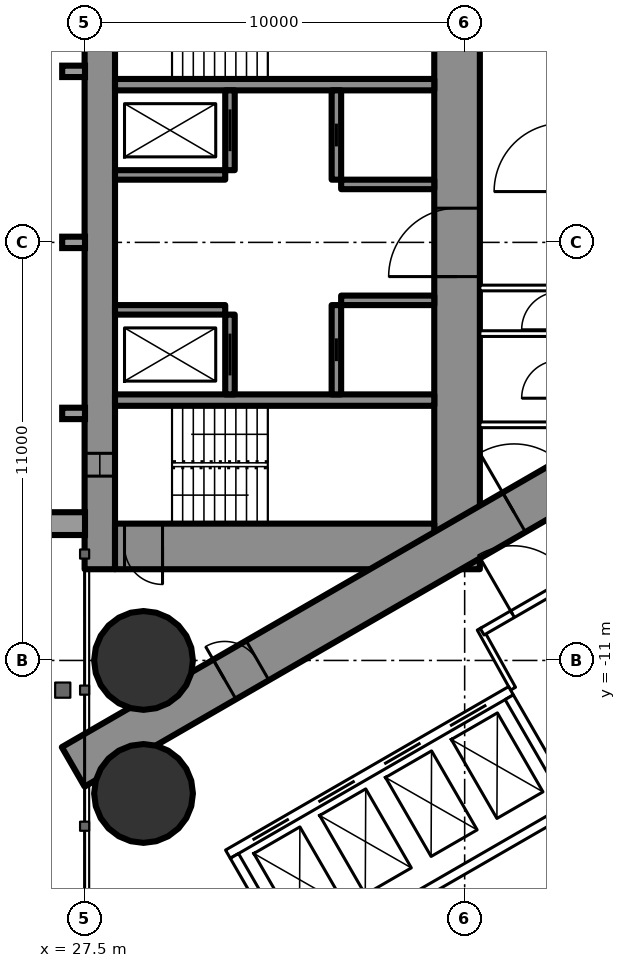
"""IFC4 building model, lengths in metres.
Left out: names, types, materials, properties, quantities, classifications, styles, units other than length and angle.
Written with IfcOpenShell. Run it as: python <this file> out.ifc"""

import sys

from ifc_helpers import new_model, si_unit, direction, frame, frame_2d, origin, origin_2d, place, context, subcontext, project, spatial, rectangle, hollow_circle, extrude, element, fill, save


model = new_model("IFC4")
c1 = context("Model", 3, precision=1e-05, world=origin(), true_north=direction((0.0, 1.0)))
c2 = subcontext(c1, "Body", "Model", "MODEL_VIEW")
j1 = project(units=[si_unit("LENGTHUNIT", "METRE"), si_unit("PLANEANGLEUNIT", "RADIAN")], contexts=[c1])
p1 = place(None, origin())
s1 = spatial("IfcSite", under=j1, at=p1, CompositionType="ELEMENT")
p2 = place(p1, origin())
s2 = spatial("IfcBuilding", under=s1, at=p2, CompositionType="ELEMENT")
p3 = place(p2, frame((0.0, 0.0, 122.1)))
s3 = spatial("IfcBuildingStorey", under=s2, at=p3, CompositionType="ELEMENT", Elevation=122.1)
for number, where, z_axis, x_axis in (
    (1, (29.05, -11.0, 0.0), (0.0, 0.0, 1.0), (1.0, 0.0, 0.0)),
    (2, (29.05, -14.5, 0.0), (0.0, 0.0, 1.0), (1.0, 0.0, 0.0)),
):
    element("IfcColumn", number, at=place(p3, frame(where, z_axis=z_axis, x_axis=x_axis)), inside=s3, PredefinedType="COLUMN", context=c2, shape_type="SweptSolid", body=[
        extrude(hollow_circle(Radius=1.3, WallThickness=0.1, at=origin_2d()), origin(), (0.0, 0.0, 1.0), 3.5),
    ])
p4 = place(p3, frame((27.9, -8.6, 0.0), z_axis=(0.0, 0.0, 1.0), x_axis=(0.0, 1.0, 0.0)))
e3 = element("IfcWall", 3, at=p4, inside=s3, PredefinedType="SHEAR", context=c2, shape_type="SweptSolid", body=[
    extrude(rectangle(XDim=17.2, YDim=0.8, at=frame_2d((8.6, 0.0))), origin(), (0.0, 0.0, 1.0), 3.5),
])
p5 = place(p4, frame((2.45, 0.0, 0.6)))
e4 = element("IfcOpeningElement", 4, at=p5, cuts=e3, PredefinedType="OPENING", context=c2, shape_type="SweptSolid", body=[
    extrude(rectangle(XDim=0.6, YDim=2.1, at=frame_2d((0.3, 1.05))), frame((0.0, 0.41, 0.0), z_axis=(0.0, -1.0, 0.0), x_axis=(1.0, 0.0, 0.0)), (0.0, 0.0, 1.0), 0.82),
])
p6 = place(p4, frame((14.15, 0.0, 0.6)))
e5 = element("IfcOpeningElement", 5, at=p6, cuts=e3, PredefinedType="OPENING", context=c2, shape_type="SweptSolid", body=[
    extrude(rectangle(XDim=0.6, YDim=2.1, at=frame_2d((0.3, 1.05))), frame((0.0, 0.41, 0.0), z_axis=(0.0, -1.0, 0.0), x_axis=(1.0, 0.0, 0.0)), (0.0, 0.0, 1.0), 0.82),
])
p7 = place(p3, frame((37.3, -8.6, 0.0), z_axis=(0.0, 0.0, 1.0), x_axis=(0.0, 1.0, 0.0)))
e6 = element("IfcWall", 6, at=p7, inside=s3, PredefinedType="SHEAR", context=c2, shape_type="SweptSolid", body=[
    extrude(rectangle(XDim=17.2, YDim=1.2, at=frame_2d((8.6, 0.0))), origin(), (0.0, 0.0, 1.0), 3.5),
])
p8 = place(p7, frame((7.7, 0.0, 0.0)))
e7 = element("IfcOpeningElement", 7, at=p8, cuts=e6, PredefinedType="OPENING", context=c2, shape_type="SweptSolid", body=[
    extrude(rectangle(XDim=1.8, YDim=2.2, at=frame_2d((0.9, 1.1))), frame((0.0, 0.61, 0.0), z_axis=(0.0, -1.0, 0.0), x_axis=(1.0, 0.0, 0.0)), (0.0, 0.0, 1.0), 1.22),
])
p9 = place(p3, frame((28.3, -8.0, 0.0), z_axis=(0.0, 0.0, 1.0), x_axis=(1.0, 0.0, 0.0)))
e8 = element("IfcWall", 8, at=p9, inside=s3, PredefinedType="SHEAR", context=c2, shape_type="SweptSolid", body=[
    extrude(rectangle(XDim=8.4, YDim=1.2, at=frame_2d((4.2, 0.0))), origin(), (0.0, 0.0, 1.0), 3.5),
])
p10 = place(p9, frame((0.25, 0.0, 0.0)))
e9 = element("IfcOpeningElement", 9, at=p10, cuts=e8, PredefinedType="OPENING", context=c2, shape_type="SweptSolid", body=[
    extrude(rectangle(XDim=1.0, YDim=2.2, at=frame_2d((0.5, 1.1))), frame((0.0, 0.61, 0.0), z_axis=(0.0, -1.0, 0.0), x_axis=(1.0, 0.0, 0.0)), (0.0, 0.0, 1.0), 1.22),
])
for number, where, z_axis, x_axis in (
    (10, (28.3, -4.15, 0.0), (0.0, 0.0, 1.0), (1.0, 0.0, 0.0)),
    (11, (28.3, 4.15, 0.0), (0.0, 0.0, 1.0), (1.0, 0.0, 0.0)),
):
    element("IfcWall", number, at=place(p3, frame(where, z_axis=z_axis, x_axis=x_axis)), inside=s3, PredefinedType="SHEAR", context=c2, shape_type="SweptSolid", body=[
        extrude(rectangle(XDim=8.4, YDim=0.3, at=frame_2d((4.2, 0.0))), origin(), (0.0, 0.0, 1.0), 3.5),
    ])
p11 = place(p3, frame((31.325, -4.0, 0.0), z_axis=(0.0, 0.0, 1.0), x_axis=(0.0, 1.0, 0.0)))
e12 = element("IfcWall", 12, at=p11, inside=s3, PredefinedType="SHEAR", context=c2, shape_type="SweptSolid", body=[
    extrude(rectangle(XDim=2.1, YDim=0.25, at=frame_2d((1.05, 0.0))), origin(), (0.0, 0.0, 1.0), 3.5),
])
p12 = place(p11, frame((0.5, 0.0, 0.0)))
e13 = element("IfcOpeningElement", 13, at=p12, cuts=e12, PredefinedType="OPENING", context=c2, shape_type="SweptSolid", body=[
    extrude(rectangle(XDim=1.1, YDim=2.2, at=frame_2d((0.55, 1.1))), frame((0.0, 0.135, 0.0), z_axis=(0.0, -1.0, 0.0), x_axis=(1.0, 0.0, 0.0)), (0.0, 0.0, 1.0), 0.27),
])
p13 = place(p3, frame((34.125, -4.0, 0.0), z_axis=(0.0, 0.0, 1.0), x_axis=(0.0, 1.0, 0.0)))
e14 = element("IfcWall", 14, at=p13, inside=s3, PredefinedType="SHEAR", context=c2, shape_type="SweptSolid", body=[
    extrude(rectangle(XDim=2.35, YDim=0.25, at=frame_2d((1.175, 0.0))), origin(), (0.0, 0.0, 1.0), 3.5),
])
p14 = place(p13, frame((0.875, 0.0, 0.0)))
e15 = element("IfcOpeningElement", 15, at=p14, cuts=e14, PredefinedType="OPENING", context=c2, shape_type="SweptSolid", body=[
    extrude(rectangle(XDim=0.6, YDim=2.0, at=frame_2d((0.3, 1.0))), frame((0.0, 0.135, 0.0), z_axis=(0.0, -1.0, 0.0), x_axis=(1.0, 0.0, 0.0)), (0.0, 0.0, 1.0), 0.27),
])
p15 = place(p3, frame((28.3, -1.775, 0.0), z_axis=(0.0, 0.0, 1.0), x_axis=(1.0, 0.0, 0.0)))
e16 = element("IfcWall", 16, at=p15, inside=s3, PredefinedType="SHEAR", context=c2, shape_type="SweptSolid", body=[
    extrude(rectangle(XDim=2.9, YDim=0.25, at=frame_2d((1.45, 0.0))), origin(), (0.0, 0.0, 1.0), 3.5),
])
p16 = place(p3, frame((34.25, -1.525, 0.0), z_axis=(0.0, 0.0, 1.0), x_axis=(1.0, 0.0, 0.0)))
e17 = element("IfcWall", 17, at=p16, inside=s3, PredefinedType="SHEAR", context=c2, shape_type="SweptSolid", body=[
    extrude(rectangle(XDim=2.45, YDim=0.25, at=frame_2d((1.225, 0.0))), origin(), (0.0, 0.0, 1.0), 3.5),
])
p17 = place(p3, frame((31.325, 1.9, 0.0), z_axis=(0.0, 0.0, 1.0), x_axis=(0.0, 1.0, 0.0)))
e18 = element("IfcWall", 18, at=p17, inside=s3, PredefinedType="SHEAR", context=c2, shape_type="SweptSolid", body=[
    extrude(rectangle(XDim=2.1, YDim=0.25, at=frame_2d((1.05, 0.0))), origin(), (0.0, 0.0, 1.0), 3.5),
])
p18 = place(p17, frame((0.5, 0.0, 0.0)))
e19 = element("IfcOpeningElement", 19, at=p18, cuts=e18, PredefinedType="OPENING", context=c2, shape_type="SweptSolid", body=[
    extrude(rectangle(XDim=1.1, YDim=2.2, at=frame_2d((0.55, 1.1))), frame((0.0, 0.135, 0.0), z_axis=(0.0, -1.0, 0.0), x_axis=(1.0, 0.0, 0.0)), (0.0, 0.0, 1.0), 0.27),
])
p19 = place(p3, frame((34.125, 1.65, 0.0), z_axis=(0.0, 0.0, 1.0), x_axis=(0.0, 1.0, 0.0)))
e20 = element("IfcWall", 20, at=p19, inside=s3, PredefinedType="SHEAR", context=c2, shape_type="SweptSolid", body=[
    extrude(rectangle(XDim=2.35, YDim=0.25, at=frame_2d((1.175, 0.0))), origin(), (0.0, 0.0, 1.0), 3.5),
])
p20 = place(p19, frame((0.875, 0.0, 0.0)))
e21 = element("IfcOpeningElement", 21, at=p20, cuts=e20, PredefinedType="OPENING", context=c2, shape_type="SweptSolid", body=[
    extrude(rectangle(XDim=0.6, YDim=2.0, at=frame_2d((0.3, 1.0))), frame((0.0, 0.135, 0.0), z_axis=(0.0, -1.0, 0.0), x_axis=(1.0, 0.0, 0.0)), (0.0, 0.0, 1.0), 0.27),
])
p21 = place(p3, frame((28.3, 1.775, 0.0), z_axis=(0.0, 0.0, 1.0), x_axis=(1.0, 0.0, 0.0)))
e22 = element("IfcWall", 22, at=p21, inside=s3, PredefinedType="SHEAR", context=c2, shape_type="SweptSolid", body=[
    extrude(rectangle(XDim=2.9, YDim=0.25, at=frame_2d((1.45, 0.0))), origin(), (0.0, 0.0, 1.0), 3.5),
])
p22 = place(p3, frame((34.25, 1.525, 0.0), z_axis=(0.0, 0.0, 1.0), x_axis=(1.0, 0.0, 0.0)))
e23 = element("IfcWall", 23, at=p22, inside=s3, PredefinedType="SHEAR", context=c2, shape_type="SweptSolid", body=[
    extrude(rectangle(XDim=2.45, YDim=0.25, at=frame_2d((1.225, 0.0))), origin(), (0.0, 0.0, 1.0), 3.5),
])
p23 = place(p3, frame((27.2, -13.8, 0.0), z_axis=(0.0, 0.0, 1.0), x_axis=(0.866027159892, 0.499996958321, 0.0)))
e24 = element("IfcWall", 24, at=p23, inside=s3, PredefinedType="SHEAR", context=c2, shape_type="SweptSolid", body=[
    extrude(rectangle(XDim=27.947, YDim=1.2, at=frame_2d((13.973, 0.0))), origin(), (0.0, 0.0, 1.0), 3.5),
])
p24 = place(p23, frame((4.6, 0.0, 0.0)))
e25 = element("IfcOpeningElement", 25, at=p24, cuts=e24, PredefinedType="OPENING", context=c2, shape_type="SweptSolid", body=[
    extrude(rectangle(XDim=1.0, YDim=2.2, at=frame_2d((0.5, 1.1))), frame((0.0, 0.61, 0.0), z_axis=(0.0, -1.0, 0.0), x_axis=(1.0, 0.0, 0.0)), (0.0, 0.0, 1.0), 1.22),
])
p25 = place(p23, frame((13.395, 0.0, 0.0)))
e26 = element("IfcOpeningElement", 26, at=p25, cuts=e24, PredefinedType="OPENING", context=c2, shape_type="SweptSolid", body=[
    extrude(rectangle(XDim=1.8, YDim=2.2, at=frame_2d((0.9, 1.1))), frame((0.0, 0.61, 0.0), z_axis=(0.0, -1.0, 0.0), x_axis=(1.0, 0.0, 0.0)), (0.0, 0.0, 1.0), 1.22),
])
p26 = place(p3, frame((27.2, 13.8, 0.0), z_axis=(0.0, 0.0, 1.0), x_axis=(0.866024515034, -0.500001539357, 0.0)))
e27 = element("IfcWall", 27, at=p26, inside=s3, PredefinedType="SHEAR", context=c2, shape_type="SweptSolid", body=[
    extrude(rectangle(XDim=26.907, YDim=1.2, at=frame_2d((13.454, 0.0))), origin(), (0.0, 0.0, 1.0), 3.5),
])
p27 = place(p26, frame((4.6, 0.0, 0.0)))
e28 = element("IfcOpeningElement", 28, at=p27, cuts=e27, PredefinedType="OPENING", context=c2, shape_type="SweptSolid", body=[
    extrude(rectangle(XDim=1.0, YDim=2.2, at=frame_2d((0.5, 1.1))), frame((0.0, 0.61, 0.0), z_axis=(0.0, -1.0, 0.0), x_axis=(1.0, 0.0, 0.0)), (0.0, 0.0, 1.0), 1.22),
])
p28 = place(p26, frame((13.395, 0.0, 0.0)))
e29 = element("IfcOpeningElement", 29, at=p28, cuts=e27, PredefinedType="OPENING", context=c2, shape_type="SweptSolid", body=[
    extrude(rectangle(XDim=1.8, YDim=2.2, at=frame_2d((0.9, 1.1))), frame((0.0, 0.61, 0.0), z_axis=(0.0, -1.0, 0.0), x_axis=(1.0, 0.0, 0.0)), (0.0, 0.0, 1.0), 1.22),
])
p29 = place(p3, frame((36.834, 10.894, 0.0), z_axis=(0.0, 0.0, 1.0), x_axis=(0.866028157229, -0.499995230863, 0.0)))
e30 = element("IfcWall", 30, at=p29, inside=s3, PredefinedType="PARTITIONING", context=c2, shape_type="SweptSolid", body=[
    extrude(rectangle(XDim=21.667, YDim=0.2, at=frame_2d((10.833, 0.0))), origin(), (0.0, 0.0, 1.0), 3.25),
])
p30 = place(p29, frame((20.117, 0.0, 0.0)))
e31 = element("IfcOpeningElement", 31, at=p30, cuts=e30, PredefinedType="OPENING", context=c2, shape_type="SweptSolid", body=[
    extrude(rectangle(XDim=0.95, YDim=2.2, at=frame_2d((0.475, 1.1))), frame((0.0, 0.11, 0.0), z_axis=(0.0, -1.0, 0.0), x_axis=(1.0, 0.0, 0.0)), (0.0, 0.0, 1.0), 0.22),
])
p31 = place(p29, frame((14.04, 0.0, 0.0)))
e32 = element("IfcOpeningElement", 32, at=p31, cuts=e30, PredefinedType="OPENING", context=c2, shape_type="SweptSolid", body=[
    extrude(rectangle(XDim=0.95, YDim=2.2, at=frame_2d((0.475, 1.1))), frame((0.0, 0.11, 0.0), z_axis=(0.0, -1.0, 0.0), x_axis=(1.0, 0.0, 0.0)), (0.0, 0.0, 1.0), 0.22),
])
p32 = place(p29, frame((7.697, 0.0, 0.0)))
e33 = element("IfcOpeningElement", 33, at=p32, cuts=e30, PredefinedType="OPENING", context=c2, shape_type="SweptSolid", body=[
    extrude(rectangle(XDim=0.95, YDim=2.2, at=frame_2d((0.475, 1.1))), frame((0.0, 0.11, 0.0), z_axis=(0.0, -1.0, 0.0), x_axis=(1.0, 0.0, 0.0)), (0.0, 0.0, 1.0), 0.22),
])
p33 = place(p29, frame((3.35, 0.0, 0.0)))
e34 = element("IfcOpeningElement", 34, at=p33, cuts=e30, PredefinedType="OPENING", context=c2, shape_type="SweptSolid", body=[
    extrude(rectangle(XDim=1.0, YDim=2.2, at=frame_2d((0.5, 1.1))), frame((0.0, 0.11, 0.0), z_axis=(0.0, -1.0, 0.0), x_axis=(1.0, 0.0, 0.0)), (0.0, 0.0, 1.0), 0.22),
])
p34 = place(p3, frame((38.773, -11.742, 0.0), z_axis=(0.0, 0.0, 1.0), x_axis=(-0.485528096672, 0.8742210632, 0.0)))
e35 = element("IfcWall", 35, at=p34, inside=s3, PredefinedType="PARTITIONING", context=c2, shape_type="SweptSolid", body=[
    extrude(rectangle(XDim=1.805, YDim=0.15, at=frame_2d((0.903, 0.0))), origin(), (0.0, 0.0, 1.0), 3.25),
])
p35 = place(p3, frame((37.96, -10.243, 0.0), z_axis=(0.0, 0.0, 1.0), x_axis=(0.866042886279, 0.499969718208, 0.0)))
e36 = element("IfcWall", 36, at=p35, inside=s3, PredefinedType="PARTITIONING", context=c2, shape_type="SweptSolid", body=[
    extrude(rectangle(XDim=3.647, YDim=0.2, at=frame_2d((1.823, 0.0))), origin(), (0.0, 0.0, 1.0), 3.25),
])
p36 = place(p35, frame((0.923, 0.0, 0.0)))
e37 = element("IfcOpeningElement", 37, at=p36, cuts=e36, PredefinedType="OPENING", context=c2, shape_type="SweptSolid", body=[
    extrude(rectangle(XDim=1.8, YDim=2.2, at=frame_2d((0.9, 1.1))), frame((0.0, 0.11, 0.0), z_axis=(0.0, -1.0, 0.0), x_axis=(1.0, 0.0, 0.0)), (0.0, 0.0, 1.0), 0.22),
])
for number, where, z_axis, x_axis in (
    (38, (37.9, -1.2, 0.0), (0.0, 0.0, 1.0), (1.0, 0.0, 0.0)),
    (39, (37.9, -2.4, 0.0), (0.0, 0.0, 1.0), (1.0, 0.0, 0.0)),
    (40, (37.9, -4.8, 0.0), (0.0, 0.0, 1.0), (1.0, 0.0, 0.0)),
):
    element("IfcWall", number, at=place(p3, frame(where, z_axis=z_axis, x_axis=x_axis)), inside=s3, PredefinedType="PARTITIONING", context=c2, shape_type="SweptSolid", body=[
        extrude(rectangle(XDim=2.175, YDim=0.15, at=frame_2d((1.087, 0.0))), origin(), (0.0, 0.0, 1.0), 3.25),
    ])
p37 = place(p3, frame((31.271, -16.097, 0.0), z_axis=(0.0, 0.0, 1.0), x_axis=(0.86604045752, 0.499973925258, 0.0)))
e41 = element("IfcWall", 41, at=p37, inside=s3, PredefinedType="PARTITIONING", context=c2, shape_type="SweptSolid", body=[
    extrude(rectangle(XDim=8.6, YDim=0.25, at=frame_2d((4.3, 0.0))), origin(), (0.0, 0.0, 1.0), 3.25),
])
p38 = place(p37, frame((0.75, 0.0, 0.0)))
e42 = element("IfcOpeningElement", 42, at=p38, cuts=e41, PredefinedType="OPENING", context=c2, shape_type="SweptSolid", body=[
    extrude(rectangle(XDim=1.1, YDim=2.2, at=frame_2d((0.55, 1.1))), frame((0.0, 0.135, 0.0), z_axis=(0.0, -1.0, 0.0), x_axis=(1.0, 0.0, 0.0)), (0.0, 0.0, 1.0), 0.27),
])
p39 = place(p37, frame((2.75, 0.0, 0.0)))
e43 = element("IfcOpeningElement", 43, at=p39, cuts=e41, PredefinedType="OPENING", context=c2, shape_type="SweptSolid", body=[
    extrude(rectangle(XDim=1.1, YDim=2.2, at=frame_2d((0.55, 1.1))), frame((0.0, 0.135, 0.0), z_axis=(0.0, -1.0, 0.0), x_axis=(1.0, 0.0, 0.0)), (0.0, 0.0, 1.0), 0.27),
])
p40 = place(p37, frame((4.75, 0.0, 0.0)))
e44 = element("IfcOpeningElement", 44, at=p40, cuts=e41, PredefinedType="OPENING", context=c2, shape_type="SweptSolid", body=[
    extrude(rectangle(XDim=1.1, YDim=2.2, at=frame_2d((0.55, 1.1))), frame((0.0, 0.135, 0.0), z_axis=(0.0, -1.0, 0.0), x_axis=(1.0, 0.0, 0.0)), (0.0, 0.0, 1.0), 0.27),
])
p41 = place(p37, frame((6.75, 0.0, 0.0)))
e45 = element("IfcOpeningElement", 45, at=p41, cuts=e41, PredefinedType="OPENING", context=c2, shape_type="SweptSolid", body=[
    extrude(rectangle(XDim=1.1, YDim=2.2, at=frame_2d((0.55, 1.1))), frame((0.0, 0.135, 0.0), z_axis=(0.0, -1.0, 0.0), x_axis=(1.0, 0.0, 0.0)), (0.0, 0.0, 1.0), 0.27),
])
p42 = place(p3, frame((32.996, -19.086, 0.0), z_axis=(0.0, 0.0, 1.0), x_axis=(0.866028165386, 0.499995216735, 0.0)))
e46 = element("IfcWall", 46, at=p42, inside=s3, PredefinedType="PARTITIONING", context=c2, shape_type="SweptSolid", body=[
    extrude(rectangle(XDim=8.6, YDim=0.25, at=frame_2d((4.3, 0.0))), origin(), (0.0, 0.0, 1.0), 3.25),
])
for number, where, z_axis, x_axis in (
    (47, (31.441, -16.143, 0.0), (0.0, 0.0, 1.0), (0.5, -0.866, 0.0)),
    (48, (38.673, -11.968, 0.0), (0.0, 0.0, 1.0), (0.5, -0.866, 0.0)),
):
    element("IfcWall", number, at=place(p3, frame(where, z_axis=z_axis, x_axis=x_axis)), inside=s3, PredefinedType="PARTITIONING", context=c2, shape_type="SweptSolid", body=[
        extrude(rectangle(XDim=3.201, YDim=0.25, at=frame_2d((1.6, 0.0))), origin(), (0.0, 0.0, 1.0), 3.25),
    ])
p43 = place(p36, origin())
e49 = element("IfcDoor", 49, at=p43, inside=s3, OperationType="DOUBLE_DOOR_SINGLE_SWING", PredefinedType="DOOR", context=c2, shape_type="SweptSolid", body=[
    extrude(rectangle(XDim=1.8, YDim=2.2, at=frame_2d((0.9, 1.1))), frame((0.0, 0.025, 0.0), z_axis=(0.0, -1.0, 0.0), x_axis=(1.0, 0.0, 0.0)), (0.0, 0.0, 1.0), 0.05),
])
fill(e37, e49)
p44 = place(p24, origin())
e50 = element("IfcDoor", 50, at=p44, inside=s3, OperationType="SINGLE_SWING_LEFT", PredefinedType="DOOR", context=c2, shape_type="SweptSolid", body=[
    extrude(rectangle(XDim=1.0, YDim=2.2, at=frame_2d((0.5, 1.1))), frame((0.0, 0.025, 0.0), z_axis=(0.0, -1.0, 0.0), x_axis=(1.0, 0.0, 0.0)), (0.0, 0.0, 1.0), 0.05),
])
fill(e25, e50)
p45 = place(p25, origin())
e51 = element("IfcDoor", 51, at=p45, inside=s3, OperationType="DOUBLE_DOOR_SINGLE_SWING", PredefinedType="DOOR", context=c2, shape_type="SweptSolid", body=[
    extrude(rectangle(XDim=1.8, YDim=2.2, at=frame_2d((0.9, 1.1))), frame((0.0, 0.025, 0.0), z_axis=(0.0, -1.0, 0.0), x_axis=(1.0, 0.0, 0.0)), (0.0, 0.0, 1.0), 0.05),
])
fill(e26, e51)
p46 = place(p8, origin())
e52 = element("IfcDoor", 52, at=p46, inside=s3, OperationType="DOUBLE_DOOR_SINGLE_SWING", PredefinedType="DOOR", context=c2, shape_type="SweptSolid", body=[
    extrude(rectangle(XDim=1.8, YDim=2.2, at=frame_2d((0.9, 1.1))), frame((0.0, 0.025, 0.0), z_axis=(0.0, -1.0, 0.0), x_axis=(1.0, 0.0, 0.0)), (0.0, 0.0, 1.0), 0.05),
])
fill(e7, e52)
p47 = place(p10, origin())
e53 = element("IfcDoor", 53, at=p47, inside=s3, OperationType="SINGLE_SWING_RIGHT", PredefinedType="DOOR", context=c2, shape_type="SweptSolid", body=[
    extrude(rectangle(XDim=1.0, YDim=2.2, at=frame_2d((0.5, 1.1))), frame((0.0, 0.025, 0.0), z_axis=(0.0, -1.0, 0.0), x_axis=(1.0, 0.0, 0.0)), (0.0, 0.0, 1.0), 0.05),
])
fill(e9, e53)
p48 = place(p12, origin())
e54 = element("IfcDoor", 54, at=p48, inside=s3, OperationType="SLIDING_TO_LEFT", PredefinedType="USERDEFINED", context=c2, shape_type="SweptSolid", body=[
    extrude(rectangle(XDim=1.1, YDim=2.2, at=frame_2d((0.55, 1.1))), frame((0.0, 0.025, 0.0), z_axis=(0.0, -1.0, 0.0), x_axis=(1.0, 0.0, 0.0)), (0.0, 0.0, 1.0), 0.05),
])
fill(e13, e54)
p49 = place(p18, origin())
e55 = element("IfcDoor", 55, at=p49, inside=s3, OperationType="SLIDING_TO_LEFT", PredefinedType="USERDEFINED", context=c2, shape_type="SweptSolid", body=[
    extrude(rectangle(XDim=1.1, YDim=2.2, at=frame_2d((0.55, 1.1))), frame((0.0, 0.025, 0.0), z_axis=(0.0, -1.0, 0.0), x_axis=(1.0, 0.0, 0.0)), (0.0, 0.0, 1.0), 0.05),
])
fill(e19, e55)
p50 = place(p14, origin())
e56 = element("IfcDoor", 56, at=p50, inside=s3, OperationType="SLIDING_TO_LEFT", PredefinedType="DOOR", context=c2, shape_type="SweptSolid", body=[
    extrude(rectangle(XDim=0.6, YDim=2.0, at=frame_2d((0.3, 1.0))), frame((0.0, 0.025, 0.0), z_axis=(0.0, -1.0, 0.0), x_axis=(1.0, 0.0, 0.0)), (0.0, 0.0, 1.0), 0.05),
])
fill(e15, e56)
p51 = place(p20, origin())
e57 = element("IfcDoor", 57, at=p51, inside=s3, OperationType="SLIDING_TO_LEFT", PredefinedType="DOOR", context=c2, shape_type="SweptSolid", body=[
    extrude(rectangle(XDim=0.6, YDim=2.0, at=frame_2d((0.3, 1.0))), frame((0.0, 0.025, 0.0), z_axis=(0.0, -1.0, 0.0), x_axis=(1.0, 0.0, 0.0)), (0.0, 0.0, 1.0), 0.05),
])
fill(e21, e57)
p52 = place(p38, origin())
e58 = element("IfcDoor", 58, at=p52, inside=s3, OperationType="DOUBLE_DOOR_SLIDING", PredefinedType="USERDEFINED", context=c2, shape_type="SweptSolid", body=[
    extrude(rectangle(XDim=1.1, YDim=2.2, at=frame_2d((0.55, 1.1))), frame((0.0, 0.025, 0.0), z_axis=(0.0, -1.0, 0.0), x_axis=(1.0, 0.0, 0.0)), (0.0, 0.0, 1.0), 0.05),
])
fill(e42, e58)
p53 = place(p39, origin())
e59 = element("IfcDoor", 59, at=p53, inside=s3, OperationType="DOUBLE_DOOR_SLIDING", PredefinedType="USERDEFINED", context=c2, shape_type="SweptSolid", body=[
    extrude(rectangle(XDim=1.1, YDim=2.2, at=frame_2d((0.55, 1.1))), frame((0.0, 0.025, 0.0), z_axis=(0.0, -1.0, 0.0), x_axis=(1.0, 0.0, 0.0)), (0.0, 0.0, 1.0), 0.05),
])
fill(e43, e59)
p54 = place(p40, origin())
e60 = element("IfcDoor", 60, at=p54, inside=s3, OperationType="DOUBLE_DOOR_SLIDING", PredefinedType="USERDEFINED", context=c2, shape_type="SweptSolid", body=[
    extrude(rectangle(XDim=1.1, YDim=2.2, at=frame_2d((0.55, 1.1))), frame((0.0, 0.025, 0.0), z_axis=(0.0, -1.0, 0.0), x_axis=(1.0, 0.0, 0.0)), (0.0, 0.0, 1.0), 0.05),
])
fill(e44, e60)
p55 = place(p41, origin())
e61 = element("IfcDoor", 61, at=p55, inside=s3, OperationType="DOUBLE_DOOR_SLIDING", PredefinedType="USERDEFINED", context=c2, shape_type="SweptSolid", body=[
    extrude(rectangle(XDim=1.1, YDim=2.2, at=frame_2d((0.55, 1.1))), frame((0.0, 0.025, 0.0), z_axis=(0.0, -1.0, 0.0), x_axis=(1.0, 0.0, 0.0)), (0.0, 0.0, 1.0), 0.05),
])
fill(e45, e61)
p56 = place(p5, origin())
e62 = element("IfcWindow", 62, at=p56, inside=s3, PartitioningType="SINGLE_PANEL", PredefinedType="WINDOW", context=c2, shape_type="SweptSolid", body=[
    extrude(rectangle(XDim=0.6, YDim=2.1, at=frame_2d((0.3, 1.05))), frame((0.0, 0.03, 0.0), z_axis=(0.0, -1.0, 0.0), x_axis=(1.0, 0.0, 0.0)), (0.0, 0.0, 1.0), 0.06),
])
fill(e4, e62)
save(model, sys.argv[1])
